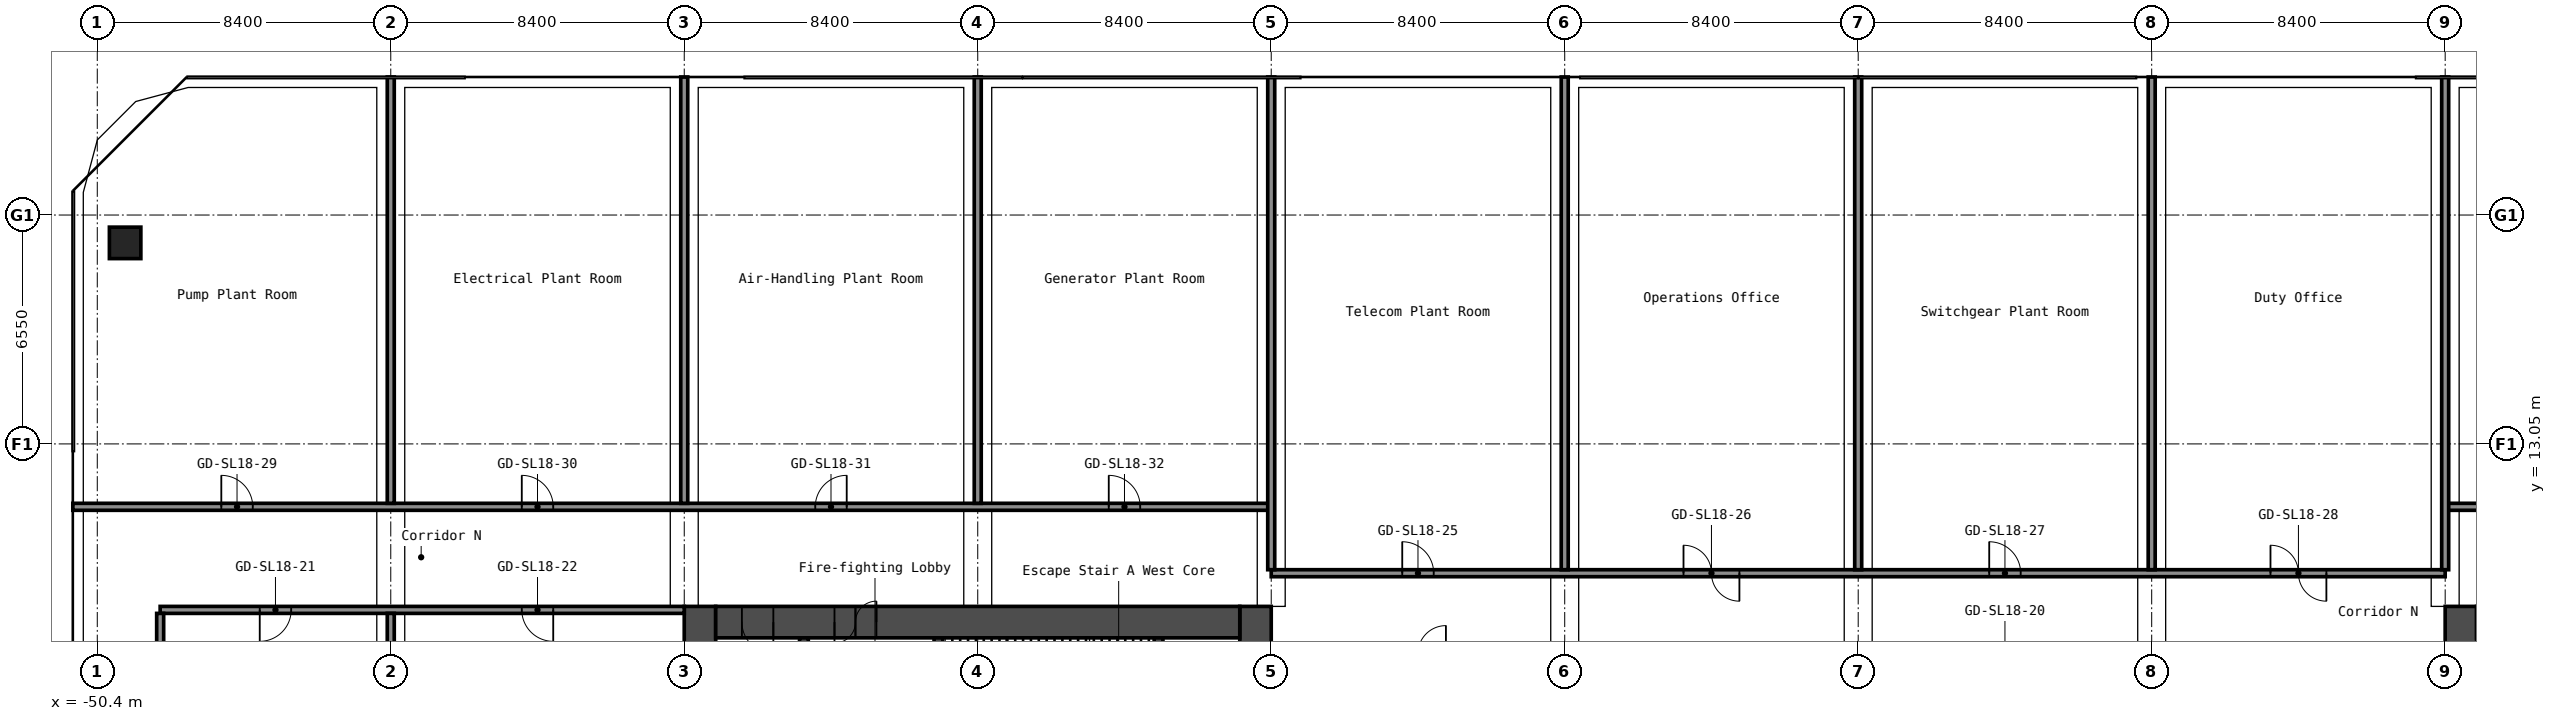
"""IFC4 building model, lengths in metres.
Left out: names, types, materials, properties, quantities, classifications, styles, units other than length and angle.
Written with IfcOpenShell. Run it as: python <this file> out.ifc"""

import sys

from ifc_helpers import new_model, si_unit, direction, frame, frame_2d, origin, origin_2d, place, context, subcontext, project, spatial, rectangle, hollow_rectangle, extrude, element, fill, save


model = new_model("IFC4")
c1 = context("Model", 3, precision=1e-05, world=origin(), true_north=direction((0.0, 1.0)))
c2 = subcontext(c1, "Body", "Model", "MODEL_VIEW")
j1 = project(units=[si_unit("LENGTHUNIT", "METRE"), si_unit("PLANEANGLEUNIT", "RADIAN")], contexts=[c1])
p1 = place(None, origin())
s1 = spatial("IfcSite", under=j1, at=p1, CompositionType="ELEMENT")
p2 = place(p1, origin())
s2 = spatial("IfcBuilding", under=s1, at=p2, CompositionType="ELEMENT")
p3 = place(p2, frame((0.0, 0.0, 64.6)))
s3 = spatial("IfcBuildingStorey", under=s2, at=p3, CompositionType="ELEMENT", Elevation=64.6)
p4 = place(p3, frame((-49.603, 18.803, 0.0), z_axis=(0.0, 0.0, 1.0), x_axis=(1.0, 0.0, 0.0)))
e1 = element("IfcColumn", 1, at=p4, inside=s3, PredefinedType="COLUMN", context=c2, shape_type="SweptSolid", body=[
    extrude(hollow_rectangle(XDim=0.9, YDim=0.9, WallThickness=0.036, at=origin_2d()), origin(), (0.0, 0.0, 1.0), 4.1),
])
p5 = place(p3, frame((-17.25, -8.4, 0.0), z_axis=(0.0, 0.0, 1.0), x_axis=(0.0, 1.0, 0.0)))
e2 = element("IfcWall", 2, at=p5, inside=s3, PredefinedType="SHEAR", context=c2, shape_type="SweptSolid", body=[
    extrude(rectangle(XDim=16.8, YDim=0.9, at=frame_2d((8.4, 0.0))), origin(), (0.0, 0.0, 1.0), 4.1),
])
p6 = place(p5, frame((7.6, 0.0, 0.0)))
e3 = element("IfcOpeningElement", 3, at=p6, cuts=e2, PredefinedType="OPENING", context=c2, shape_type="SweptSolid", body=[
    extrude(rectangle(XDim=1.2, YDim=2.1, at=frame_2d((0.6, 1.05))), frame((0.0, 0.46, 0.0), z_axis=(0.0, -1.0, 0.0), x_axis=(1.0, 0.0, 0.0)), (0.0, 0.0, 1.0), 0.92),
])
p7 = place(p3, frame((-33.15, -8.4, 0.0), z_axis=(0.0, 0.0, 1.0), x_axis=(0.0, 1.0, 0.0)))
e4 = element("IfcWall", 4, at=p7, inside=s3, PredefinedType="SHEAR", context=c2, shape_type="SweptSolid", body=[
    extrude(rectangle(XDim=16.8, YDim=0.9, at=frame_2d((8.4, 0.0))), origin(), (0.0, 0.0, 1.0), 4.1),
])
p8 = place(p3, frame((-32.7, 7.95, 0.0), z_axis=(0.0, 0.0, 1.0), x_axis=(1.0, 0.0, 0.0)))
e5 = element("IfcWall", 5, at=p8, inside=s3, PredefinedType="SHEAR", context=c2, shape_type="SweptSolid", body=[
    extrude(rectangle(XDim=15.0, YDim=0.9, at=frame_2d((7.5, 0.0))), origin(), (0.0, 0.0, 1.0), 4.1),
])
p9 = place(p8, frame((3.4, 0.0, 0.0)))
e6 = element("IfcOpeningElement", 6, at=p9, cuts=e5, PredefinedType="OPENING", context=c2, shape_type="SweptSolid", body=[
    extrude(rectangle(XDim=1.2, YDim=2.1, at=frame_2d((0.6, 1.05))), frame((0.0, 0.46, 0.0), z_axis=(0.0, -1.0, 0.0), x_axis=(1.0, 0.0, 0.0)), (0.0, 0.0, 1.0), 0.92),
])
p10 = place(p8, frame((0.75, 0.0, 0.0)))
e7 = element("IfcOpeningElement", 7, at=p10, cuts=e5, PredefinedType="OPENING", context=c2, shape_type="SweptSolid", body=[
    extrude(rectangle(XDim=0.9, YDim=2.1, at=frame_2d((0.45, 1.05))), frame((0.0, 0.46, 0.0), z_axis=(0.0, -1.0, 0.0), x_axis=(1.0, 0.0, 0.0)), (0.0, 0.0, 1.0), 0.92),
])
p11 = place(p3, frame((-20.025, 1.2, 0.0), z_axis=(0.0, 0.0, 1.0), x_axis=(0.0, 1.0, 0.0)))
e8 = element("IfcWall", 8, at=p11, inside=s3, PredefinedType="SHEAR", context=c2, shape_type="SweptSolid", body=[
    extrude(rectangle(XDim=6.3, YDim=0.25, at=frame_2d((3.15, 0.0))), origin(), (0.0, 0.0, 1.0), 4.1),
])
p12 = place(p3, frame((-26.325, 3.75, 0.0), z_axis=(0.0, 0.0, 1.0), x_axis=(0.0, 1.0, 0.0)))
e9 = element("IfcWall", 9, at=p12, inside=s3, PredefinedType="SHEAR", context=c2, shape_type="SweptSolid", body=[
    extrude(rectangle(XDim=3.75, YDim=0.25, at=frame_2d((1.875, 0.0))), origin(), (0.0, 0.0, 1.0), 4.1),
])
p13 = place(p12, frame((1.25, 0.0, 0.0)))
e10 = element("IfcOpeningElement", 10, at=p13, cuts=e9, PredefinedType="OPENING", context=c2, shape_type="SweptSolid", body=[
    extrude(rectangle(XDim=1.2, YDim=2.1, at=frame_2d((0.6, 1.05))), frame((0.0, 0.135, 0.0), z_axis=(0.0, -1.0, 0.0), x_axis=(1.0, 0.0, 0.0)), (0.0, 0.0, 1.0), 0.27),
])
p14 = place(p3, frame((-30.175, 1.45, 0.0), z_axis=(0.0, 0.0, 1.0), x_axis=(0.0, 1.0, 0.0)))
e11 = element("IfcWall", 11, at=p14, inside=s3, PredefinedType="SHEAR", context=c2, shape_type="SweptSolid", body=[
    extrude(rectangle(XDim=6.05, YDim=0.25, at=frame_2d((3.025, 0.0))), origin(), (0.0, 0.0, 1.0), 4.1),
])
p15 = place(p14, frame((2.625, 0.0, 0.0)))
e12 = element("IfcOpeningElement", 12, at=p15, cuts=e11, PredefinedType="OPENING", context=c2, shape_type="SweptSolid", body=[
    extrude(rectangle(XDim=1.1, YDim=2.1, at=frame_2d((0.55, 1.05))), frame((0.0, 0.135, 0.0), z_axis=(0.0, -1.0, 0.0), x_axis=(1.0, 0.0, 0.0)), (0.0, 0.0, 1.0), 0.27),
])
p16 = place(p3, frame((17.25, -8.4, 0.0), z_axis=(0.0, 0.0, 1.0), x_axis=(0.0, 1.0, 0.0)))
e13 = element("IfcWall", 13, at=p16, inside=s3, PredefinedType="SHEAR", context=c2, shape_type="SweptSolid", body=[
    extrude(rectangle(XDim=16.8, YDim=0.9, at=frame_2d((8.4, 0.0))), origin(), (0.0, 0.0, 1.0), 4.1),
])
p17 = place(p16, frame((7.6, 0.0, 0.0)))
e14 = element("IfcOpeningElement", 14, at=p17, cuts=e13, PredefinedType="OPENING", context=c2, shape_type="SweptSolid", body=[
    extrude(rectangle(XDim=1.2, YDim=2.1, at=frame_2d((0.6, 1.05))), frame((0.0, 0.46, 0.0), z_axis=(0.0, -1.0, 0.0), x_axis=(1.0, 0.0, 0.0)), (0.0, 0.0, 1.0), 0.92),
])
p18 = place(p3, frame((17.7, 7.95, 0.0), z_axis=(0.0, 0.0, 1.0), x_axis=(1.0, 0.0, 0.0)))
e15 = element("IfcWall", 15, at=p18, inside=s3, PredefinedType="SHEAR", context=c2, shape_type="SweptSolid", body=[
    extrude(rectangle(XDim=15.0, YDim=0.9, at=frame_2d((7.5, 0.0))), origin(), (0.0, 0.0, 1.0), 4.1),
])
p19 = place(p18, frame((10.4, 0.0, 0.0)))
e16 = element("IfcOpeningElement", 16, at=p19, cuts=e15, PredefinedType="OPENING", context=c2, shape_type="SweptSolid", body=[
    extrude(rectangle(XDim=1.2, YDim=2.1, at=frame_2d((0.6, 1.05))), frame((0.0, 0.46, 0.0), z_axis=(0.0, -1.0, 0.0), x_axis=(1.0, 0.0, 0.0)), (0.0, 0.0, 1.0), 0.92),
])
p20 = place(p18, frame((13.35, 0.0, 0.0)))
e17 = element("IfcOpeningElement", 17, at=p20, cuts=e15, PredefinedType="OPENING", context=c2, shape_type="SweptSolid", body=[
    extrude(rectangle(XDim=0.9, YDim=2.1, at=frame_2d((0.45, 1.05))), frame((0.0, 0.46, 0.0), z_axis=(0.0, -1.0, 0.0), x_axis=(1.0, 0.0, 0.0)), (0.0, 0.0, 1.0), 0.92),
])
p21 = place(p3, frame((-48.6, 8.3, 0.0), z_axis=(0.0, 0.0, 1.0), x_axis=(1.0, 0.0, 0.0)))
e18 = element("IfcWall", 18, at=p21, inside=s3, PredefinedType="PARTITIONING", context=c2, shape_type="SweptSolid", body=[
    extrude(rectangle(XDim=15.0, YDim=0.2, at=frame_2d((7.5, 0.0))), origin(), (0.0, 0.0, 1.0), 4.1),
])
p22 = place(p21, frame((2.85, 0.0, 0.0)))
e19 = element("IfcOpeningElement", 19, at=p22, cuts=e18, PredefinedType="OPENING", context=c2, shape_type="SweptSolid", body=[
    extrude(rectangle(XDim=0.9, YDim=2.1, at=frame_2d((0.45, 1.05))), frame((0.0, 0.11, 0.0), z_axis=(0.0, -1.0, 0.0), x_axis=(1.0, 0.0, 0.0)), (0.0, 0.0, 1.0), 0.22),
])
p23 = place(p21, frame((10.35, 0.0, 0.0)))
e20 = element("IfcOpeningElement", 20, at=p23, cuts=e18, PredefinedType="OPENING", context=c2, shape_type="SweptSolid", body=[
    extrude(rectangle(XDim=0.9, YDim=2.1, at=frame_2d((0.45, 1.05))), frame((0.0, 0.11, 0.0), z_axis=(0.0, -1.0, 0.0), x_axis=(1.0, 0.0, 0.0)), (0.0, 0.0, 1.0), 0.22),
])
p24 = place(p3, frame((-16.8, 9.35, 0.0), z_axis=(0.0, 0.0, 1.0), x_axis=(1.0, 0.0, 0.0)))
e21 = element("IfcWall", 21, at=p24, inside=s3, PredefinedType="PARTITIONING", context=c2, shape_type="SweptSolid", body=[
    extrude(rectangle(XDim=33.6, YDim=0.2, at=frame_2d((16.8, 0.0))), origin(), (0.0, 0.0, 1.0), 4.1),
])
p25 = place(p24, frame((3.75, 0.0, 0.0)))
e22 = element("IfcOpeningElement", 22, at=p25, cuts=e21, PredefinedType="OPENING", context=c2, shape_type="SweptSolid", body=[
    extrude(rectangle(XDim=0.9, YDim=2.1, at=frame_2d((0.45, 1.05))), frame((0.0, 0.11, 0.0), z_axis=(0.0, -1.0, 0.0), x_axis=(1.0, 0.0, 0.0)), (0.0, 0.0, 1.0), 0.22),
])
p26 = place(p24, frame((11.8, 0.0, 0.0)))
e23 = element("IfcOpeningElement", 23, at=p26, cuts=e21, PredefinedType="OPENING", context=c2, shape_type="SweptSolid", body=[
    extrude(rectangle(XDim=1.6, YDim=2.1, at=frame_2d((0.8, 1.05))), frame((0.0, 0.11, 0.0), z_axis=(0.0, -1.0, 0.0), x_axis=(1.0, 0.0, 0.0)), (0.0, 0.0, 1.0), 0.22),
])
p27 = place(p24, frame((20.55, 0.0, 0.0)))
e24 = element("IfcOpeningElement", 24, at=p27, cuts=e21, PredefinedType="OPENING", context=c2, shape_type="SweptSolid", body=[
    extrude(rectangle(XDim=0.9, YDim=2.1, at=frame_2d((0.45, 1.05))), frame((0.0, 0.11, 0.0), z_axis=(0.0, -1.0, 0.0), x_axis=(1.0, 0.0, 0.0)), (0.0, 0.0, 1.0), 0.22),
])
p28 = place(p24, frame((28.6, 0.0, 0.0)))
e25 = element("IfcOpeningElement", 25, at=p28, cuts=e21, PredefinedType="OPENING", context=c2, shape_type="SweptSolid", body=[
    extrude(rectangle(XDim=1.6, YDim=2.1, at=frame_2d((0.8, 1.05))), frame((0.0, 0.11, 0.0), z_axis=(0.0, -1.0, 0.0), x_axis=(1.0, 0.0, 0.0)), (0.0, 0.0, 1.0), 0.22),
])
p29 = place(p3, frame((-51.1, 11.25, 0.0), z_axis=(0.0, 0.0, 1.0), x_axis=(1.0, 0.0, 0.0)))
e26 = element("IfcWall", 26, at=p29, inside=s3, PredefinedType="PARTITIONING", context=c2, shape_type="SweptSolid", body=[
    extrude(rectangle(XDim=34.3, YDim=0.2, at=frame_2d((17.15, 0.0))), origin(), (0.0, 0.0, 1.0), 4.1),
])
p30 = place(p29, frame((4.25, 0.0, 0.0)))
e27 = element("IfcOpeningElement", 27, at=p30, cuts=e26, PredefinedType="OPENING", context=c2, shape_type="SweptSolid", body=[
    extrude(rectangle(XDim=0.9, YDim=2.1, at=frame_2d((0.45, 1.05))), frame((0.0, 0.11, 0.0), z_axis=(0.0, -1.0, 0.0), x_axis=(1.0, 0.0, 0.0)), (0.0, 0.0, 1.0), 0.22),
])
p31 = place(p29, frame((12.85, 0.0, 0.0)))
e28 = element("IfcOpeningElement", 28, at=p31, cuts=e26, PredefinedType="OPENING", context=c2, shape_type="SweptSolid", body=[
    extrude(rectangle(XDim=0.9, YDim=2.1, at=frame_2d((0.45, 1.05))), frame((0.0, 0.11, 0.0), z_axis=(0.0, -1.0, 0.0), x_axis=(1.0, 0.0, 0.0)), (0.0, 0.0, 1.0), 0.22),
])
p32 = place(p29, frame((21.25, 0.0, 0.0)))
e29 = element("IfcOpeningElement", 29, at=p32, cuts=e26, PredefinedType="OPENING", context=c2, shape_type="SweptSolid", body=[
    extrude(rectangle(XDim=0.9, YDim=2.1, at=frame_2d((0.45, 1.05))), frame((0.0, 0.11, 0.0), z_axis=(0.0, -1.0, 0.0), x_axis=(1.0, 0.0, 0.0)), (0.0, 0.0, 1.0), 0.22),
])
p33 = place(p29, frame((29.65, 0.0, 0.0)))
e30 = element("IfcOpeningElement", 30, at=p33, cuts=e26, PredefinedType="OPENING", context=c2, shape_type="SweptSolid", body=[
    extrude(rectangle(XDim=0.9, YDim=2.1, at=frame_2d((0.45, 1.05))), frame((0.0, 0.11, 0.0), z_axis=(0.0, -1.0, 0.0), x_axis=(1.0, 0.0, 0.0)), (0.0, 0.0, 1.0), 0.22),
])
p34 = place(p3, frame((16.8, 11.25, 0.0), z_axis=(0.0, 0.0, 1.0), x_axis=(1.0, 0.0, 0.0)))
e31 = element("IfcWall", 31, at=p34, inside=s3, PredefinedType="PARTITIONING", context=c2, shape_type="SweptSolid", body=[
    extrude(rectangle(XDim=34.3, YDim=0.2, at=frame_2d((17.15, 0.0))), origin(), (0.0, 0.0, 1.0), 4.1),
])
p35 = place(p34, frame((3.75, 0.0, 0.0)))
e32 = element("IfcOpeningElement", 32, at=p35, cuts=e31, PredefinedType="OPENING", context=c2, shape_type="SweptSolid", body=[
    extrude(rectangle(XDim=0.9, YDim=2.1, at=frame_2d((0.45, 1.05))), frame((0.0, 0.11, 0.0), z_axis=(0.0, -1.0, 0.0), x_axis=(1.0, 0.0, 0.0)), (0.0, 0.0, 1.0), 0.22),
])
p36 = place(p34, frame((9.545, 0.0, 0.0)))
e33 = element("IfcOpeningElement", 33, at=p36, cuts=e31, PredefinedType="OPENING", context=c2, shape_type="SweptSolid", body=[
    extrude(rectangle(XDim=0.9, YDim=2.1, at=frame_2d((0.45, 1.05))), frame((0.0, 0.11, 0.0), z_axis=(0.0, -1.0, 0.0), x_axis=(1.0, 0.0, 0.0)), (0.0, 0.0, 1.0), 0.22),
])
p37 = place(p34, frame((13.745, 0.0, 0.0)))
e34 = element("IfcOpeningElement", 34, at=p37, cuts=e31, PredefinedType="OPENING", context=c2, shape_type="SweptSolid", body=[
    extrude(rectangle(XDim=0.9, YDim=2.1, at=frame_2d((0.45, 1.05))), frame((0.0, 0.11, 0.0), z_axis=(0.0, -1.0, 0.0), x_axis=(1.0, 0.0, 0.0)), (0.0, 0.0, 1.0), 0.22),
])
p38 = place(p34, frame((20.55, 0.0, 0.0)))
e35 = element("IfcOpeningElement", 35, at=p38, cuts=e31, PredefinedType="OPENING", context=c2, shape_type="SweptSolid", body=[
    extrude(rectangle(XDim=0.9, YDim=2.1, at=frame_2d((0.45, 1.05))), frame((0.0, 0.11, 0.0), z_axis=(0.0, -1.0, 0.0), x_axis=(1.0, 0.0, 0.0)), (0.0, 0.0, 1.0), 0.22),
])
p39 = place(p34, frame((29.15, 0.0, 0.0)))
e36 = element("IfcOpeningElement", 36, at=p39, cuts=e31, PredefinedType="OPENING", context=c2, shape_type="SweptSolid", body=[
    extrude(rectangle(XDim=0.9, YDim=2.1, at=frame_2d((0.45, 1.05))), frame((0.0, 0.11, 0.0), z_axis=(0.0, -1.0, 0.0), x_axis=(1.0, 0.0, 0.0)), (0.0, 0.0, 1.0), 0.22),
])
for number, where, z_axis, x_axis in (
    (37, (-48.6, -8.2, 0.0), (0.0, 0.0, 1.0), (0.0, 1.0, 0.0)),
    (38, (-42.0, -8.2, 0.0), (0.0, 0.0, 1.0), (0.0, 1.0, 0.0)),
):
    element("IfcWall", number, at=place(p3, frame(where, z_axis=z_axis, x_axis=x_axis)), inside=s3, PredefinedType="PARTITIONING", context=c2, shape_type="SweptSolid", body=[
        extrude(rectangle(XDim=16.4, YDim=0.2, at=frame_2d((8.2, 0.0))), origin(), (0.0, 0.0, 1.0), 4.1),
    ])
for number, where, z_axis, x_axis in (
    (39, (-42.0, 11.35, 0.0), (0.0, 0.0, 1.0), (0.0, 1.0, 0.0)),
    (40, (-33.6, 11.35, 0.0), (0.0, 0.0, 1.0), (0.0, 1.0, 0.0)),
    (41, (-25.2, 11.35, 0.0), (0.0, 0.0, 1.0), (0.0, 1.0, 0.0)),
):
    element("IfcWall", number, at=place(p3, frame(where, z_axis=z_axis, x_axis=x_axis)), inside=s3, PredefinedType="PARTITIONING", context=c2, shape_type="SweptSolid", body=[
        extrude(rectangle(XDim=12.2, YDim=0.2, at=frame_2d((6.1, 0.0))), origin(), (0.0, 0.0, 1.0), 4.1),
    ])
for number, where, z_axis, x_axis in (
    (42, (-16.8, 9.45, 0.0), (0.0, 0.0, 1.0), (0.0, 1.0, 0.0)),
    (43, (-8.4, 9.45, 0.0), (0.0, 0.0, 1.0), (0.0, 1.0, 0.0)),
    (44, (0.0, 9.45, 0.0), (0.0, 0.0, 1.0), (0.0, 1.0, 0.0)),
    (45, (8.4, 9.45, 0.0), (0.0, 0.0, 1.0), (0.0, 1.0, 0.0)),
    (46, (16.8, 9.45, 0.0), (0.0, 0.0, 1.0), (0.0, 1.0, 0.0)),
):
    element("IfcWall", number, at=place(p3, frame(where, z_axis=z_axis, x_axis=x_axis)), inside=s3, PredefinedType="PARTITIONING", context=c2, shape_type="SweptSolid", body=[
        extrude(rectangle(XDim=14.1, YDim=0.2, at=frame_2d((7.05, 0.0))), origin(), (0.0, 0.0, 1.0), 4.1),
    ])
p40 = place(p9, origin())
e47 = element("IfcDoor", 47, at=p40, inside=s3, OperationType="DOUBLE_DOOR_SINGLE_SWING", PredefinedType="DOOR", context=c2, shape_type="SweptSolid", body=[
    extrude(rectangle(XDim=1.2, YDim=2.1, at=frame_2d((0.6, 1.05))), frame((0.0, 0.025, 0.0), z_axis=(0.0, -1.0, 0.0), x_axis=(1.0, 0.0, 0.0)), (0.0, 0.0, 1.0), 0.05),
])
fill(e6, e47)
p41 = place(p10, origin())
e48 = element("IfcDoor", 48, at=p41, inside=s3, OperationType="SINGLE_SWING_RIGHT", PredefinedType="DOOR", context=c2, shape_type="SweptSolid", body=[
    extrude(rectangle(XDim=0.9, YDim=2.1, at=frame_2d((0.45, 1.05))), frame((0.0, 0.025, 0.0), z_axis=(0.0, -1.0, 0.0), x_axis=(1.0, 0.0, 0.0)), (0.0, 0.0, 1.0), 0.05),
])
fill(e7, e48)
p42 = place(p22, origin())
e49 = element("IfcDoor", 49, at=p42, inside=s3, OperationType="SINGLE_SWING_LEFT", PredefinedType="DOOR", context=c2, shape_type="SweptSolid", body=[
    extrude(rectangle(XDim=0.9, YDim=2.1, at=frame_2d((0.45, 1.05))), frame((0.0, 0.025, 0.0), z_axis=(0.0, -1.0, 0.0), x_axis=(1.0, 0.0, 0.0)), (0.0, 0.0, 1.0), 0.05),
])
fill(e19, e49)
p43 = place(p23, origin())
e50 = element("IfcDoor", 50, at=p43, inside=s3, OperationType="SINGLE_SWING_RIGHT", PredefinedType="DOOR", context=c2, shape_type="SweptSolid", body=[
    extrude(rectangle(XDim=0.9, YDim=2.1, at=frame_2d((0.45, 1.05))), frame((0.0, 0.025, 0.0), z_axis=(0.0, -1.0, 0.0), x_axis=(1.0, 0.0, 0.0)), (0.0, 0.0, 1.0), 0.05),
])
fill(e20, e50)
p44 = place(p25, origin())
e51 = element("IfcDoor", 51, at=p44, inside=s3, OperationType="SINGLE_SWING_RIGHT", PredefinedType="DOOR", context=c2, shape_type="SweptSolid", body=[
    extrude(rectangle(XDim=0.9, YDim=2.1, at=frame_2d((0.45, 1.05))), frame((0.0, 0.025, 0.0), z_axis=(0.0, -1.0, 0.0), x_axis=(1.0, 0.0, 0.0)), (0.0, 0.0, 1.0), 0.05),
])
fill(e22, e51)
p45 = place(p26, origin())
e52 = element("IfcDoor", 52, at=p45, inside=s3, OperationType="DOUBLE_DOOR_SINGLE_SWING", PredefinedType="DOOR", context=c2, shape_type="SweptSolid", body=[
    extrude(rectangle(XDim=1.6, YDim=2.1, at=frame_2d((0.8, 1.05))), frame((0.0, 0.025, 0.0), z_axis=(0.0, -1.0, 0.0), x_axis=(1.0, 0.0, 0.0)), (0.0, 0.0, 1.0), 0.05),
])
fill(e23, e52)
p46 = place(p27, origin())
e53 = element("IfcDoor", 53, at=p46, inside=s3, OperationType="SINGLE_SWING_RIGHT", PredefinedType="DOOR", context=c2, shape_type="SweptSolid", body=[
    extrude(rectangle(XDim=0.9, YDim=2.1, at=frame_2d((0.45, 1.05))), frame((0.0, 0.025, 0.0), z_axis=(0.0, -1.0, 0.0), x_axis=(1.0, 0.0, 0.0)), (0.0, 0.0, 1.0), 0.05),
])
fill(e24, e53)
p47 = place(p28, origin())
e54 = element("IfcDoor", 54, at=p47, inside=s3, OperationType="DOUBLE_DOOR_SINGLE_SWING", PredefinedType="DOOR", context=c2, shape_type="SweptSolid", body=[
    extrude(rectangle(XDim=1.6, YDim=2.1, at=frame_2d((0.8, 1.05))), frame((0.0, 0.025, 0.0), z_axis=(0.0, -1.0, 0.0), x_axis=(1.0, 0.0, 0.0)), (0.0, 0.0, 1.0), 0.05),
])
fill(e25, e54)
p48 = place(p30, origin())
e55 = element("IfcDoor", 55, at=p48, inside=s3, OperationType="SINGLE_SWING_RIGHT", PredefinedType="DOOR", context=c2, shape_type="SweptSolid", body=[
    extrude(rectangle(XDim=0.9, YDim=2.1, at=frame_2d((0.45, 1.05))), frame((0.0, 0.025, 0.0), z_axis=(0.0, -1.0, 0.0), x_axis=(1.0, 0.0, 0.0)), (0.0, 0.0, 1.0), 0.05),
])
fill(e27, e55)
p49 = place(p31, origin())
e56 = element("IfcDoor", 56, at=p49, inside=s3, OperationType="SINGLE_SWING_RIGHT", PredefinedType="DOOR", context=c2, shape_type="SweptSolid", body=[
    extrude(rectangle(XDim=0.9, YDim=2.1, at=frame_2d((0.45, 1.05))), frame((0.0, 0.025, 0.0), z_axis=(0.0, -1.0, 0.0), x_axis=(1.0, 0.0, 0.0)), (0.0, 0.0, 1.0), 0.05),
])
fill(e28, e56)
p50 = place(p32, origin())
e57 = element("IfcDoor", 57, at=p50, inside=s3, OperationType="SINGLE_SWING_LEFT", PredefinedType="DOOR", context=c2, shape_type="SweptSolid", body=[
    extrude(rectangle(XDim=0.9, YDim=2.1, at=frame_2d((0.45, 1.05))), frame((0.0, 0.025, 0.0), z_axis=(0.0, -1.0, 0.0), x_axis=(1.0, 0.0, 0.0)), (0.0, 0.0, 1.0), 0.05),
])
fill(e29, e57)
p51 = place(p33, origin())
e58 = element("IfcDoor", 58, at=p51, inside=s3, OperationType="SINGLE_SWING_RIGHT", PredefinedType="DOOR", context=c2, shape_type="SweptSolid", body=[
    extrude(rectangle(XDim=0.9, YDim=2.1, at=frame_2d((0.45, 1.05))), frame((0.0, 0.025, 0.0), z_axis=(0.0, -1.0, 0.0), x_axis=(1.0, 0.0, 0.0)), (0.0, 0.0, 1.0), 0.05),
])
fill(e30, e58)
save(model, sys.argv[1])
